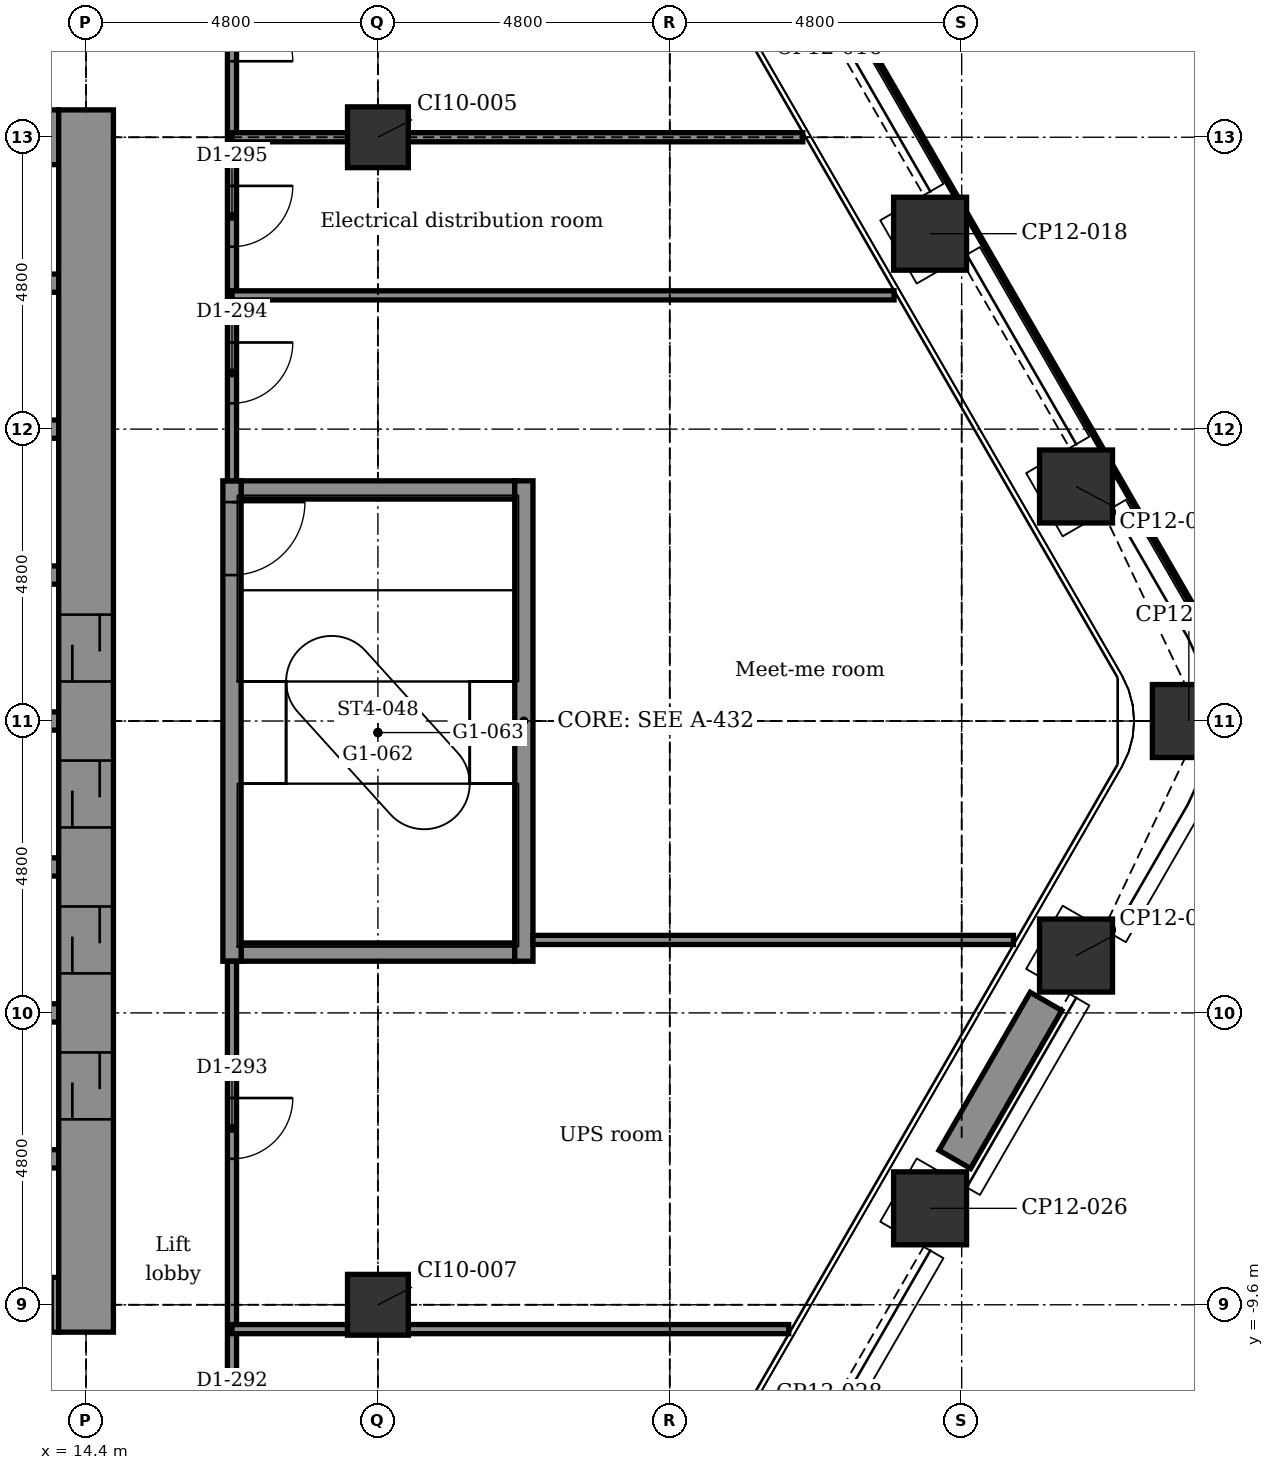
"""IFC4 building model, lengths in metres.
Left out: names, types, materials, properties, quantities, classifications, styles, units other than length and angle.
Written with IfcOpenShell. Run it as: python <this file> out.ifc"""

import sys

from ifc_helpers import new_model, si_unit, direction, frame, frame_2d, origin, origin_2d, place, context, subcontext, project, spatial, rectangle, extrude, element, fill, save


model = new_model("IFC4")
c1 = context("Model", 3, precision=1e-05, world=origin(), true_north=direction((0.0, 1.0)))
c2 = subcontext(c1, "Body", "Model", "MODEL_VIEW")
j1 = project(units=[si_unit("LENGTHUNIT", "METRE"), si_unit("PLANEANGLEUNIT", "RADIAN")], contexts=[c1])
p1 = place(None, origin())
s1 = spatial("IfcSite", under=j1, at=p1, CompositionType="ELEMENT")
p2 = place(p1, origin())
s2 = spatial("IfcBuilding", under=s1, at=p2, CompositionType="ELEMENT")
p3 = place(p2, frame((0.0, 0.0, 109.4)))
s3 = spatial("IfcBuildingStorey", under=s2, at=p3, CompositionType="ELEMENT", Elevation=109.4)
for number, where, z_axis, x_axis in (
    (1, (28.28, 8.014, -0.2), (0.0, 0.0, 1.0), (0.866, 0.5, 0.0)),
    (2, (30.68, 3.857, -0.2), (0.0, 0.0, 1.0), (0.866, 0.5, 0.0)),
    (3, (32.536, 0.0, -0.2), (0.0, 0.0, 1.0), (1.0, 0.0, 0.0)),
    (4, (30.68, -3.857, -0.2), (0.0, 0.0, 1.0), (0.5, 0.866, 0.0)),
    (5, (28.28, -8.014, -0.2), (0.0, 0.0, 1.0), (0.5, 0.866, 0.0)),
):
    element("IfcColumn", number, at=place(p3, frame(where, z_axis=z_axis, x_axis=x_axis)), inside=s3, PredefinedType="COLUMN", context=c2, shape_type="SweptSolid", body=[
        extrude(rectangle(XDim=1.2, YDim=1.2, at=origin_2d()), origin(), (0.0, 0.0, 1.0), 4.5),
    ])
for number, where, z_axis, x_axis in (
    (6, (19.2, -9.6, -0.2), (0.0, 0.0, 1.0), (1.0, 0.0, 0.0)),
    (7, (19.2, 9.6, -0.2), (0.0, 0.0, 1.0), (1.0, 0.0, 0.0)),
):
    element("IfcColumn", number, at=place(p3, frame(where, z_axis=z_axis, x_axis=x_axis)), inside=s3, PredefinedType="COLUMN", context=c2, shape_type="SweptSolid", body=[
        extrude(rectangle(XDim=1.0, YDim=1.0, at=origin_2d()), origin(), (0.0, 0.0, 1.0), 4.5),
    ])
p4 = place(p3, frame((10.05, -9.6, -0.2), z_axis=(0.0, 0.0, 1.0), x_axis=(1.0, 0.0, 0.0)))
e8 = element("IfcWall", 8, at=p4, inside=s3, PredefinedType="SHEAR", context=c2, shape_type="SweptSolid", body=[
    extrude(rectangle(XDim=3.9, YDim=0.9, at=frame_2d((1.95, 0.0))), origin(), (0.0, 0.0, 1.0), 4.5),
])
p5 = place(p4, frame((0.5, 0.0, 0.2)))
e9 = element("IfcOpeningElement", 9, at=p5, cuts=e8, PredefinedType="OPENING", context=c2, shape_type="SweptSolid", body=[
    extrude(rectangle(XDim=0.9, YDim=2.1, at=frame_2d((0.45, 1.05))), frame((0.0, 0.46, 0.0), z_axis=(0.0, -1.0, 0.0), x_axis=(1.0, 0.0, 0.0)), (0.0, 0.0, 1.0), 0.92),
])
p6 = place(p4, frame((2.9, 0.0, 0.2)))
e10 = element("IfcOpeningElement", 10, at=p6, cuts=e8, PredefinedType="OPENING", context=c2, shape_type="SweptSolid", body=[
    extrude(rectangle(XDim=0.9, YDim=2.1, at=frame_2d((0.45, 1.05))), frame((0.0, 0.46, 0.0), z_axis=(0.0, -1.0, 0.0), x_axis=(1.0, 0.0, 0.0)), (0.0, 0.0, 1.0), 0.92),
])
for number, where, z_axis, x_axis in (
    (11, (10.05, -7.2, -0.2), (0.0, 0.0, 1.0), (1.0, 0.0, 0.0)),
    (12, (10.05, -4.8, -0.2), (0.0, 0.0, 1.0), (1.0, 0.0, 0.0)),
):
    element("IfcWall", number, at=place(p3, frame(where, z_axis=z_axis, x_axis=x_axis)), inside=s3, PredefinedType="STANDARD", context=c2, shape_type="SweptSolid", body=[
        extrude(rectangle(XDim=3.9, YDim=0.3, at=frame_2d((1.95, 0.0))), origin(), (0.0, 0.0, 1.0), 4.5),
    ])
p7 = place(p3, frame((16.95, -3.8, -0.2), z_axis=(0.0, 0.0, 1.0), x_axis=(1.0, 0.0, 0.0)))
e13 = element("IfcWall", 13, at=p7, inside=s3, PredefinedType="STANDARD", context=c2, shape_type="SweptSolid", body=[
    extrude(rectangle(XDim=4.5, YDim=0.3, at=frame_2d((2.25, 0.0))), origin(), (0.0, 0.0, 1.0), 4.5),
])
for number, where, z_axis, x_axis in (
    (14, (10.05, -2.4, -0.2), (0.0, 0.0, 1.0), (1.0, 0.0, 0.0)),
    (15, (10.05, 0.0, -0.2), (0.0, 0.0, 1.0), (1.0, 0.0, 0.0)),
    (16, (10.05, 2.4, -0.2), (0.0, 0.0, 1.0), (1.0, 0.0, 0.0)),
):
    element("IfcWall", number, at=place(p3, frame(where, z_axis=z_axis, x_axis=x_axis)), inside=s3, PredefinedType="STANDARD", context=c2, shape_type="SweptSolid", body=[
        extrude(rectangle(XDim=3.9, YDim=0.3, at=frame_2d((1.95, 0.0))), origin(), (0.0, 0.0, 1.0), 4.5),
    ])
p8 = place(p3, frame((16.95, 3.8, -0.2), z_axis=(0.0, 0.0, 1.0), x_axis=(1.0, 0.0, 0.0)))
e17 = element("IfcWall", 17, at=p8, inside=s3, PredefinedType="STANDARD", context=c2, shape_type="SweptSolid", body=[
    extrude(rectangle(XDim=4.5, YDim=0.3, at=frame_2d((2.25, 0.0))), origin(), (0.0, 0.0, 1.0), 4.5),
])
for number, where, z_axis, x_axis in (
    (18, (10.05, 4.8, -0.2), (0.0, 0.0, 1.0), (1.0, 0.0, 0.0)),
    (19, (10.05, 7.2, -0.2), (0.0, 0.0, 1.0), (1.0, 0.0, 0.0)),
):
    element("IfcWall", number, at=place(p3, frame(where, z_axis=z_axis, x_axis=x_axis)), inside=s3, PredefinedType="STANDARD", context=c2, shape_type="SweptSolid", body=[
        extrude(rectangle(XDim=3.9, YDim=0.3, at=frame_2d((1.95, 0.0))), origin(), (0.0, 0.0, 1.0), 4.5),
    ])
p9 = place(p3, frame((10.05, 9.6, -0.2), z_axis=(0.0, 0.0, 1.0), x_axis=(1.0, 0.0, 0.0)))
e20 = element("IfcWall", 20, at=p9, inside=s3, PredefinedType="SHEAR", context=c2, shape_type="SweptSolid", body=[
    extrude(rectangle(XDim=3.9, YDim=0.9, at=frame_2d((1.95, 0.0))), origin(), (0.0, 0.0, 1.0), 4.5),
])
p10 = place(p9, frame((1.5, 0.0, 0.2)))
e21 = element("IfcOpeningElement", 21, at=p10, cuts=e20, PredefinedType="OPENING", context=c2, shape_type="SweptSolid", body=[
    extrude(rectangle(XDim=0.9, YDim=2.1, at=frame_2d((0.45, 1.05))), frame((0.0, 0.46, 0.0), z_axis=(0.0, -1.0, 0.0), x_axis=(1.0, 0.0, 0.0)), (0.0, 0.0, 1.0), 0.92),
])
p11 = place(p3, frame((14.4, -10.05, -0.2), z_axis=(0.0, 0.0, 1.0), x_axis=(0.0, 1.0, 0.0)))
e22 = element("IfcWall", 22, at=p11, inside=s3, PredefinedType="SHEAR", context=c2, shape_type="SweptSolid", body=[
    extrude(rectangle(XDim=20.1, YDim=0.9, at=frame_2d((10.05, 0.0))), origin(), (0.0, 0.0, 1.0), 4.5),
])
p12 = place(p11, frame((3.5, 0.0, 0.2)))
e23 = element("IfcOpeningElement", 23, at=p12, cuts=e22, PredefinedType="OPENING", context=c2, shape_type="SweptSolid", body=[
    extrude(rectangle(XDim=1.1, YDim=2.1, at=frame_2d((0.55, 1.05))), frame((0.0, 0.46, 0.0), z_axis=(0.0, -1.0, 0.0), x_axis=(1.0, 0.0, 0.0)), (0.0, 0.0, 1.0), 0.92),
])
p13 = place(p11, frame((5.9, 0.0, 0.2)))
e24 = element("IfcOpeningElement", 24, at=p13, cuts=e22, PredefinedType="OPENING", context=c2, shape_type="SweptSolid", body=[
    extrude(rectangle(XDim=1.1, YDim=2.1, at=frame_2d((0.55, 1.05))), frame((0.0, 0.46, 0.0), z_axis=(0.0, -1.0, 0.0), x_axis=(1.0, 0.0, 0.0)), (0.0, 0.0, 1.0), 0.92),
])
p14 = place(p11, frame((8.3, 0.0, 0.2)))
e25 = element("IfcOpeningElement", 25, at=p14, cuts=e22, PredefinedType="OPENING", context=c2, shape_type="SweptSolid", body=[
    extrude(rectangle(XDim=1.1, YDim=2.1, at=frame_2d((0.55, 1.05))), frame((0.0, 0.46, 0.0), z_axis=(0.0, -1.0, 0.0), x_axis=(1.0, 0.0, 0.0)), (0.0, 0.0, 1.0), 0.92),
])
p15 = place(p11, frame((10.7, 0.0, 0.2)))
e26 = element("IfcOpeningElement", 26, at=p15, cuts=e22, PredefinedType="OPENING", context=c2, shape_type="SweptSolid", body=[
    extrude(rectangle(XDim=1.1, YDim=2.1, at=frame_2d((0.55, 1.05))), frame((0.0, 0.46, 0.0), z_axis=(0.0, -1.0, 0.0), x_axis=(1.0, 0.0, 0.0)), (0.0, 0.0, 1.0), 0.92),
])
p16 = place(p3, frame((16.8, -3.95, -0.2), z_axis=(0.0, 0.0, 1.0), x_axis=(0.0, 1.0, 0.0)))
e27 = element("IfcWall", 27, at=p16, inside=s3, PredefinedType="STANDARD", context=c2, shape_type="SweptSolid", body=[
    extrude(rectangle(XDim=7.9, YDim=0.3, at=frame_2d((3.95, 0.0))), origin(), (0.0, 0.0, 1.0), 4.5),
])
p17 = place(p16, frame((6.35, 0.0, 0.2)))
e28 = element("IfcOpeningElement", 28, at=p17, cuts=e27, PredefinedType="OPENING", context=c2, shape_type="SweptSolid", body=[
    extrude(rectangle(XDim=1.2, YDim=2.1, at=frame_2d((0.6, 1.05))), frame((0.0, 0.16, 0.0), z_axis=(0.0, -1.0, 0.0), x_axis=(1.0, 0.0, 0.0)), (0.0, 0.0, 1.0), 0.32),
])
p18 = place(p3, frame((21.6, -3.95, -0.2), z_axis=(0.0, 0.0, 1.0), x_axis=(0.0, 1.0, 0.0)))
e29 = element("IfcWall", 29, at=p18, inside=s3, PredefinedType="STANDARD", context=c2, shape_type="SweptSolid", body=[
    extrude(rectangle(XDim=7.9, YDim=0.3, at=frame_2d((3.95, 0.0))), origin(), (0.0, 0.0, 1.0), 4.5),
])
p19 = place(p3, frame((30.187, -4.611, 0.0), z_axis=(0.0, 0.0, 1.0), x_axis=(-0.499990139034, -0.866031096941, 0.0)))
e30 = element("IfcWall", 30, at=p19, inside=s3, PredefinedType="USERDEFINED", context=c2, shape_type="SweptSolid", body=[
    extrude(rectangle(XDim=3.0, YDim=0.6, at=frame_2d((1.5, 0.0))), origin(), (0.0, 0.0, 1.0), 0.7),
])
p20 = place(p3, frame((16.8, -13.3, 0.0), z_axis=(0.0, 0.0, 1.0), x_axis=(0.0, 1.0, 0.0)))
e31 = element("IfcWall", 31, at=p20, inside=s3, PredefinedType="PARTITIONING", context=c2, shape_type="SweptSolid", body=[
    extrude(rectangle(XDim=9.35, YDim=0.15, at=frame_2d((4.675, 0.0))), origin(), (0.0, 0.0, 1.0), 4.3),
])
p21 = place(p20, frame((0.94, 0.0, 0.0)))
e32 = element("IfcOpeningElement", 32, at=p21, cuts=e31, PredefinedType="OPENING", context=c2, shape_type="SweptSolid", body=[
    extrude(rectangle(XDim=1.0, YDim=2.1, at=frame_2d((0.5, 1.05))), frame((0.0, 0.085, 0.0), z_axis=(0.0, -1.0, 0.0), x_axis=(1.0, 0.0, 0.0)), (0.0, 0.0, 1.0), 0.17),
])
p22 = place(p20, frame((6.1, 0.0, 0.0)))
e33 = element("IfcOpeningElement", 33, at=p22, cuts=e31, PredefinedType="OPENING", context=c2, shape_type="SweptSolid", body=[
    extrude(rectangle(XDim=1.0, YDim=2.1, at=frame_2d((0.5, 1.05))), frame((0.0, 0.085, 0.0), z_axis=(0.0, -1.0, 0.0), x_axis=(1.0, 0.0, 0.0)), (0.0, 0.0, 1.0), 0.17),
])
p23 = place(p3, frame((16.8, 3.95, 0.0), z_axis=(0.0, 0.0, 1.0), x_axis=(0.0, 1.0, 0.0)))
e34 = element("IfcWall", 34, at=p23, inside=s3, PredefinedType="PARTITIONING", context=c2, shape_type="SweptSolid", body=[
    extrude(rectangle(XDim=8.75, YDim=0.15, at=frame_2d((4.375, 0.0))), origin(), (0.0, 0.0, 1.0), 4.3),
])
p24 = place(p23, frame((1.275, 0.0, 0.0)))
e35 = element("IfcOpeningElement", 35, at=p24, cuts=e34, PredefinedType="OPENING", context=c2, shape_type="SweptSolid", body=[
    extrude(rectangle(XDim=1.0, YDim=2.1, at=frame_2d((0.5, 1.05))), frame((0.0, 0.085, 0.0), z_axis=(0.0, -1.0, 0.0), x_axis=(1.0, 0.0, 0.0)), (0.0, 0.0, 1.0), 0.17),
])
p25 = place(p23, frame((3.85, 0.0, 0.0)))
e36 = element("IfcOpeningElement", 36, at=p25, cuts=e34, PredefinedType="OPENING", context=c2, shape_type="SweptSolid", body=[
    extrude(rectangle(XDim=1.0, YDim=2.1, at=frame_2d((0.5, 1.05))), frame((0.0, 0.085, 0.0), z_axis=(0.0, -1.0, 0.0), x_axis=(1.0, 0.0, 0.0)), (0.0, 0.0, 1.0), 0.17),
])
p26 = place(p23, frame((6.9, 0.0, 0.0)))
e37 = element("IfcOpeningElement", 37, at=p26, cuts=e34, PredefinedType="OPENING", context=c2, shape_type="SweptSolid", body=[
    extrude(rectangle(XDim=1.0, YDim=2.1, at=frame_2d((0.5, 1.05))), frame((0.0, 0.085, 0.0), z_axis=(0.0, -1.0, 0.0), x_axis=(1.0, 0.0, 0.0)), (0.0, 0.0, 1.0), 0.17),
])
p27 = place(p3, frame((16.8, -10.0, 0.0), z_axis=(0.0, 0.0, 1.0), x_axis=(1.0, 0.0, 0.0)))
e38 = element("IfcWall", 38, at=p27, inside=s3, PredefinedType="PARTITIONING", context=c2, shape_type="SweptSolid", body=[
    extrude(rectangle(XDim=1.9, YDim=0.15, at=frame_2d((0.95, 0.0))), origin(), (0.0, 0.0, 1.0), 4.3),
])
p28 = place(p3, frame((19.7, -10.0, 0.0), z_axis=(0.0, 0.0, 1.0), x_axis=(1.0, 0.0, 0.0)))
e39 = element("IfcWall", 39, at=p28, inside=s3, PredefinedType="PARTITIONING", context=c2, shape_type="SweptSolid", body=[
    extrude(rectangle(XDim=6.256, YDim=0.15, at=frame_2d((3.128, 0.0))), origin(), (0.0, 0.0, 1.0), 4.3),
])
p29 = place(p3, frame((21.75, -3.6, 0.0), z_axis=(0.0, 0.0, 1.0), x_axis=(1.0, 0.0, 0.0)))
e40 = element("IfcWall", 40, at=p29, inside=s3, PredefinedType="PARTITIONING", context=c2, shape_type="SweptSolid", body=[
    extrude(rectangle(XDim=7.901, YDim=0.15, at=frame_2d((3.95, 0.0))), origin(), (0.0, 0.0, 1.0), 4.3),
])
p30 = place(p3, frame((16.8, 7.0, 0.0), z_axis=(0.0, 0.0, 1.0), x_axis=(1.0, 0.0, 0.0)))
e41 = element("IfcWall", 41, at=p30, inside=s3, PredefinedType="PARTITIONING", context=c2, shape_type="SweptSolid", body=[
    extrude(rectangle(XDim=10.888, YDim=0.15, at=frame_2d((5.444, 0.0))), origin(), (0.0, 0.0, 1.0), 4.3),
])
p31 = place(p3, frame((16.8, 9.6, 0.0), z_axis=(0.0, 0.0, 1.0), x_axis=(1.0, 0.0, 0.0)))
e42 = element("IfcWall", 42, at=p31, inside=s3, PredefinedType="PARTITIONING", context=c2, shape_type="SweptSolid", body=[
    extrude(rectangle(XDim=1.9, YDim=0.15, at=frame_2d((0.95, 0.0))), origin(), (0.0, 0.0, 1.0), 3.692),
])
p32 = place(p3, frame((19.7, 9.6, 0.0), z_axis=(0.0, 0.0, 1.0), x_axis=(1.0, 0.0, 0.0)))
e43 = element("IfcWall", 43, at=p32, inside=s3, PredefinedType="PARTITIONING", context=c2, shape_type="SweptSolid", body=[
    extrude(rectangle(XDim=6.487, YDim=0.15, at=frame_2d((3.243, 0.0))), origin(), (0.0, 0.0, 1.0), 3.692),
])
p33 = place(p22, frame((1.0, 0.0, 0.0), z_axis=(0.0, 0.0, 1.0), x_axis=(-1.0, 0.0, 0.0)))
e44 = element("IfcDoor", 44, at=p33, inside=s3, OperationType="SINGLE_SWING_RIGHT", PredefinedType="DOOR", context=c2, shape_type="SweptSolid", body=[
    extrude(rectangle(XDim=1.0, YDim=2.1, at=frame_2d((0.5, 1.05))), frame((0.0, 0.025, 0.0), z_axis=(0.0, -1.0, 0.0), x_axis=(1.0, 0.0, 0.0)), (0.0, 0.0, 1.0), 0.05),
])
fill(e33, e44)
p34 = place(p24, frame((1.0, 0.0, 0.0), z_axis=(0.0, 0.0, 1.0), x_axis=(-1.0, 0.0, 0.0)))
e45 = element("IfcDoor", 45, at=p34, inside=s3, OperationType="SINGLE_SWING_RIGHT", PredefinedType="DOOR", context=c2, shape_type="SweptSolid", body=[
    extrude(rectangle(XDim=1.0, YDim=2.1, at=frame_2d((0.5, 1.05))), frame((0.0, 0.025, 0.0), z_axis=(0.0, -1.0, 0.0), x_axis=(1.0, 0.0, 0.0)), (0.0, 0.0, 1.0), 0.05),
])
fill(e35, e45)
p35 = place(p25, frame((1.0, 0.0, 0.0), z_axis=(0.0, 0.0, 1.0), x_axis=(-1.0, 0.0, 0.0)))
e46 = element("IfcDoor", 46, at=p35, inside=s3, OperationType="SINGLE_SWING_RIGHT", PredefinedType="DOOR", context=c2, shape_type="SweptSolid", body=[
    extrude(rectangle(XDim=1.0, YDim=2.1, at=frame_2d((0.5, 1.05))), frame((0.0, 0.025, 0.0), z_axis=(0.0, -1.0, 0.0), x_axis=(1.0, 0.0, 0.0)), (0.0, 0.0, 1.0), 0.05),
])
fill(e36, e46)
p36 = place(p26, frame((1.0, 0.0, 0.0), z_axis=(0.0, 0.0, 1.0), x_axis=(-1.0, 0.0, 0.0)))
e47 = element("IfcDoor", 47, at=p36, inside=s3, OperationType="SINGLE_SWING_LEFT", PredefinedType="DOOR", context=c2, shape_type="SweptSolid", body=[
    extrude(rectangle(XDim=1.0, YDim=2.1, at=frame_2d((0.5, 1.05))), frame((0.0, 0.025, 0.0), z_axis=(0.0, -1.0, 0.0), x_axis=(1.0, 0.0, 0.0)), (0.0, 0.0, 1.0), 0.05),
])
fill(e37, e47)
p37 = place(p12, origin())
e48 = element("IfcDoor", 48, at=p37, inside=s3, OperationType="DOUBLE_DOOR_SLIDING", PredefinedType="DOOR", context=c2, shape_type="SweptSolid", body=[
    extrude(rectangle(XDim=1.1, YDim=2.1, at=frame_2d((0.55, 1.05))), frame((0.0, 0.025, 0.0), z_axis=(0.0, -1.0, 0.0), x_axis=(1.0, 0.0, 0.0)), (0.0, 0.0, 1.0), 0.05),
])
fill(e23, e48)
p38 = place(p13, origin())
e49 = element("IfcDoor", 49, at=p38, inside=s3, OperationType="DOUBLE_DOOR_SLIDING", PredefinedType="DOOR", context=c2, shape_type="SweptSolid", body=[
    extrude(rectangle(XDim=1.1, YDim=2.1, at=frame_2d((0.55, 1.05))), frame((0.0, 0.025, 0.0), z_axis=(0.0, -1.0, 0.0), x_axis=(1.0, 0.0, 0.0)), (0.0, 0.0, 1.0), 0.05),
])
fill(e24, e49)
p39 = place(p14, origin())
e50 = element("IfcDoor", 50, at=p39, inside=s3, OperationType="DOUBLE_DOOR_SLIDING", PredefinedType="DOOR", context=c2, shape_type="SweptSolid", body=[
    extrude(rectangle(XDim=1.1, YDim=2.1, at=frame_2d((0.55, 1.05))), frame((0.0, 0.025, 0.0), z_axis=(0.0, -1.0, 0.0), x_axis=(1.0, 0.0, 0.0)), (0.0, 0.0, 1.0), 0.05),
])
fill(e25, e50)
p40 = place(p15, origin())
e51 = element("IfcDoor", 51, at=p40, inside=s3, OperationType="DOUBLE_DOOR_SLIDING", PredefinedType="DOOR", context=c2, shape_type="SweptSolid", body=[
    extrude(rectangle(XDim=1.1, YDim=2.1, at=frame_2d((0.55, 1.05))), frame((0.0, 0.025, 0.0), z_axis=(0.0, -1.0, 0.0), x_axis=(1.0, 0.0, 0.0)), (0.0, 0.0, 1.0), 0.05),
])
fill(e26, e51)
p41 = place(p17, frame((1.2, 0.0, 0.0), z_axis=(0.0, 0.0, 1.0), x_axis=(-1.0, 0.0, 0.0)))
e52 = element("IfcDoor", 52, at=p41, inside=s3, OperationType="SINGLE_SWING_RIGHT", PredefinedType="DOOR", context=c2, shape_type="SweptSolid", body=[
    extrude(rectangle(XDim=1.2, YDim=2.1, at=frame_2d((0.6, 1.05))), frame((0.0, 0.025, 0.0), z_axis=(0.0, -1.0, 0.0), x_axis=(1.0, 0.0, 0.0)), (0.0, 0.0, 1.0), 0.05),
])
fill(e28, e52)
save(model, sys.argv[1])
